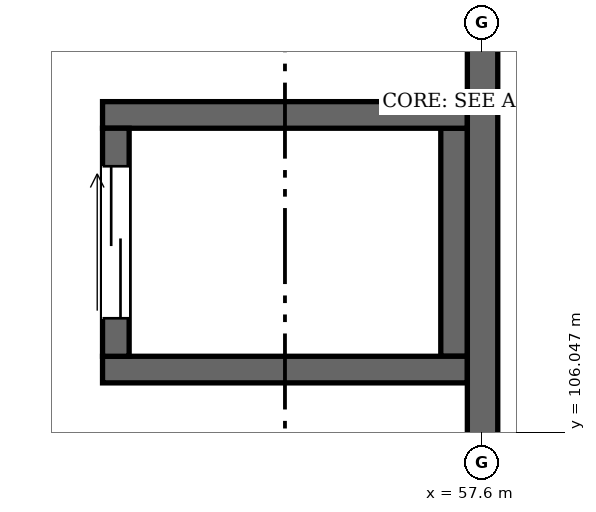
"""IFC4 building model, lengths in metres.
Left out: names, types, materials, properties, quantities, classifications, styles, units other than length and angle.
Written with IfcOpenShell. Run it as: python <this file> out.ifc"""

import sys

from ifc_helpers import new_model, si_unit, direction, frame, frame_2d, origin, place, context, subcontext, project, spatial, rectangle, extrude, element, fill, save


model = new_model("IFC4")
c1 = context("Model", 3, precision=1e-05, world=origin(), true_north=direction((0.0, 1.0)))
c2 = subcontext(c1, "Body", "Model", "MODEL_VIEW")
j1 = project(units=[si_unit("LENGTHUNIT", "METRE"), si_unit("PLANEANGLEUNIT", "RADIAN")], contexts=[c1])
p1 = place(None, origin())
s1 = spatial("IfcSite", under=j1, at=p1, CompositionType="ELEMENT")
p2 = place(p1, origin())
s2 = spatial("IfcBuilding", under=s1, at=p2, CompositionType="ELEMENT")
p3 = place(p2, frame((0.0, 0.0, 14.2)))
s3 = spatial("IfcBuildingStorey", under=s2, at=p3, CompositionType="ELEMENT", Elevation=14.2)
p4 = place(p3, frame((57.6, 94.12, 0.0), z_axis=(0.0, 0.0, 1.0), x_axis=(0.0, 1.0, 0.0)))
e1 = element("IfcWall", 1, at=p4, inside=s3, PredefinedType="SHEAR", context=c2, shape_type="SweptSolid", body=[
    extrude(rectangle(XDim=46.88, YDim=0.4, at=frame_2d((23.44, 0.0))), origin(), (0.0, 0.0, 1.0), 7.5),
])
for number, where, z_axis, x_axis in (
    (2, (52.6, 106.875, 0.0), (0.0, 0.0, 1.0), (1.0, 0.0, 0.0)),
    (3, (52.6, 110.225, 0.0), (0.0, 0.0, 1.0), (1.0, 0.0, 0.0)),
):
    element("IfcWall", number, at=place(p3, frame(where, z_axis=z_axis, x_axis=x_axis)), inside=s3, PredefinedType="SHEAR", context=c2, shape_type="SweptSolid", body=[
        extrude(rectangle(XDim=4.8, YDim=0.35, at=frame_2d((2.4, 0.0))), origin(), (0.0, 0.0, 1.0), 7.5),
    ])
p5 = place(p3, frame((52.775, 107.05, 0.0), z_axis=(0.0, 0.0, 1.0), x_axis=(0.0, 1.0, 0.0)))
e4 = element("IfcWall", 4, at=p5, inside=s3, PredefinedType="SHEAR", context=c2, shape_type="SweptSolid", body=[
    extrude(rectangle(XDim=3.0, YDim=0.35, at=frame_2d((1.5, 0.0))), origin(), (0.0, 0.0, 1.0), 7.5),
])
p6 = place(p5, frame((0.5, 0.0, 0.0)))
e5 = element("IfcOpeningElement", 5, at=p6, cuts=e4, PredefinedType="OPENING", context=c2, shape_type="SweptSolid", body=[
    extrude(rectangle(XDim=2.0, YDim=2.4, at=frame_2d((1.0, 1.2))), frame((0.0, 0.185, 0.0), z_axis=(0.0, -1.0, 0.0), x_axis=(1.0, 0.0, 0.0)), (0.0, 0.0, 1.0), 0.37),
])
p7 = place(p3, frame((57.225, 107.05, 0.0), z_axis=(0.0, 0.0, 1.0), x_axis=(0.0, 1.0, 0.0)))
e6 = element("IfcWall", 6, at=p7, inside=s3, PredefinedType="SHEAR", context=c2, shape_type="SweptSolid", body=[
    extrude(rectangle(XDim=3.0, YDim=0.35, at=frame_2d((1.5, 0.0))), origin(), (0.0, 0.0, 1.0), 7.5),
])
p8 = place(p6, origin())
e7 = element("IfcDoor", 7, at=p8, inside=s3, OperationType="DOUBLE_DOOR_SLIDING", PredefinedType="DOOR", context=c2, shape_type="SweptSolid", body=[
    extrude(rectangle(XDim=2.0, YDim=2.4, at=frame_2d((1.0, 1.2))), frame((0.0, 0.025, 0.0), z_axis=(0.0, -1.0, 0.0), x_axis=(1.0, 0.0, 0.0)), (0.0, 0.0, 1.0), 0.05),
])
fill(e5, e7)
save(model, sys.argv[1])
